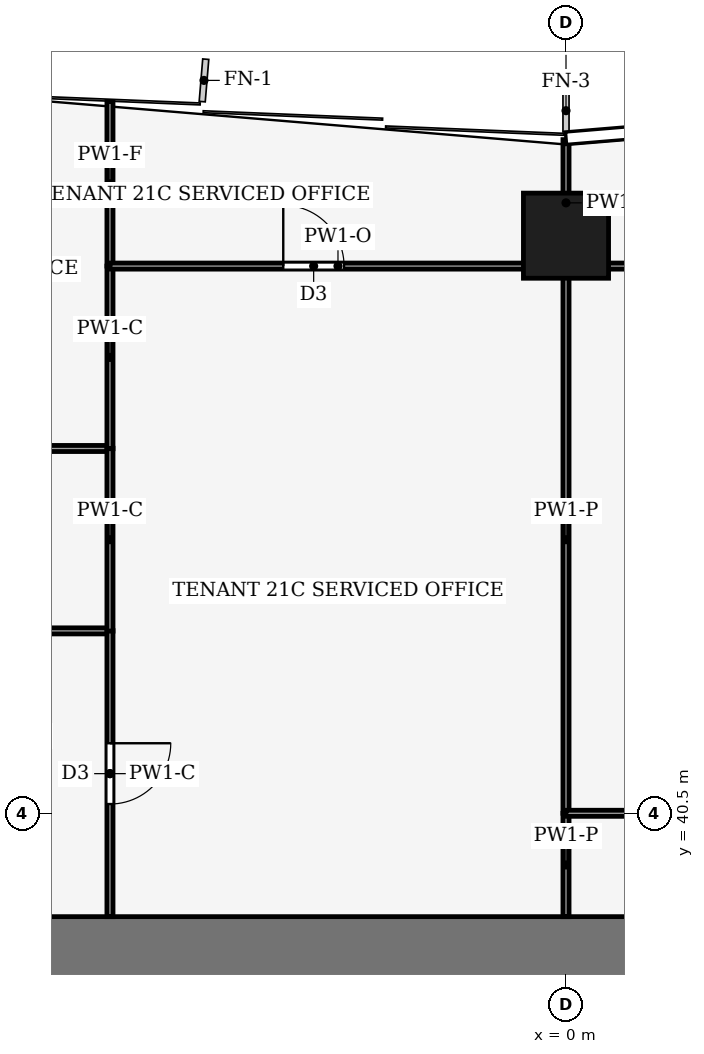
"""IFC4 building model, lengths in metres.
Left out: names, types, materials, properties, quantities, classifications, styles, units other than length and angle.
Written with IfcOpenShell. Run it as: python <this file> out.ifc"""

import sys

from ifc_helpers import new_model, si_unit, direction, frame, frame_2d, origin, origin_2d, place, context, subcontext, project, spatial, rectangle, hollow_rectangle, extrude, element, fill, save


model = new_model("IFC4")
c1 = context("Model", 3, precision=1e-05, world=origin(), true_north=direction((0.0, 1.0)))
c2 = subcontext(c1, "Body", "Model", "MODEL_VIEW")
j1 = project(units=[si_unit("LENGTHUNIT", "METRE"), si_unit("PLANEANGLEUNIT", "RADIAN")], contexts=[c1])
p1 = place(None, origin())
s1 = spatial("IfcSite", under=j1, at=p1, CompositionType="ELEMENT")
p2 = place(p1, origin())
s2 = spatial("IfcBuilding", under=s1, at=p2, CompositionType="ELEMENT")
p3 = place(p2, frame((0.0, 0.0, 94.0)))
s3 = spatial("IfcBuildingStorey", under=s2, at=p3, CompositionType="ELEMENT", Elevation=94.0)
p4 = place(p3, frame((-13.8, 38.2, -0.13), z_axis=(0.0, 0.0, 1.0), x_axis=(1.0, 0.0, 0.0)))
e1 = element("IfcWall", 1, at=p4, inside=s3, PredefinedType="SHEAR", context=c2, shape_type="SweptSolid", body=[
    extrude(rectangle(XDim=27.6, YDim=1.2, at=frame_2d((13.8, 0.0))), origin(), (0.0, 0.0, 1.0), 4.0),
])
p5 = place(p3, frame((0.0, 50.0, 0.0), z_axis=(0.0, 0.0, 1.0), x_axis=(1.0, 0.0, 0.0)))
e2 = element("IfcColumn", 2, at=p5, inside=s3, PredefinedType="COLUMN", context=c2, shape_type="SweptSolid", body=[
    extrude(hollow_rectangle(XDim=1.4, YDim=1.4, WallThickness=0.08, at=origin_2d()), origin(), (0.0, 0.0, 1.0), 4.0),
])
p6 = place(p3, frame((-13.8, 43.5, 0.0), z_axis=(0.0, 0.0, 1.0), x_axis=(1.0, 0.0, 0.0)))
e3 = element("IfcWall", 3, at=p6, inside=s3, PredefinedType="PARTITIONING", context=c2, shape_type="SweptSolid", body=[
    extrude(rectangle(XDim=6.3, YDim=0.1, at=frame_2d((3.15, 0.0))), origin(), (0.0, 0.0, 1.0), 3.39),
])
p7 = place(p6, frame((2.65, 0.0, 0.0)))
e4 = element("IfcOpeningElement", 4, at=p7, cuts=e3, PredefinedType="OPENING", context=c2, shape_type="SweptSolid", body=[
    extrude(rectangle(XDim=1.0, YDim=2.1, at=frame_2d((0.5, 1.05))), frame((0.0, 0.06, 0.0), z_axis=(0.0, -1.0, 0.0), x_axis=(1.0, 0.0, 0.0)), (0.0, 0.0, 1.0), 0.12),
])
p8 = place(p3, frame((-7.5, 43.504, 0.0), z_axis=(0.0, 0.0, 1.0), x_axis=(0.0, -1.0, 0.0)))
e5 = element("IfcWall", 5, at=p8, inside=s3, PredefinedType="PARTITIONING", context=c2, shape_type="SweptSolid", body=[
    extrude(rectangle(XDim=4.704, YDim=0.1, at=frame_2d((2.352, 0.0))), origin(), (0.0, 0.0, 1.0), 3.87),
])
p9 = place(p8, frame((1.852, 0.0, 0.0)))
e6 = element("IfcOpeningElement", 6, at=p9, cuts=e5, PredefinedType="OPENING", context=c2, shape_type="SweptSolid", body=[
    extrude(rectangle(XDim=1.0, YDim=2.1, at=frame_2d((0.5, 1.05))), frame((0.0, 0.06, 0.0), z_axis=(0.0, -1.0, 0.0), x_axis=(1.0, 0.0, 0.0)), (0.0, 0.0, 1.0), 0.12),
])
p10 = place(p3, frame((-7.5, 46.5, 0.0), z_axis=(0.0, 0.0, 1.0), x_axis=(-1.0, 0.0, 0.0)))
e7 = element("IfcWall", 7, at=p10, inside=s3, PredefinedType="PARTITIONING", context=c2, shape_type="SweptSolid", body=[
    extrude(rectangle(XDim=6.3, YDim=0.1, at=frame_2d((3.15, 0.0))), origin(), (0.0, 0.0, 1.0), 3.39),
])
p11 = place(p3, frame((-7.5, 43.496, 0.0), z_axis=(0.0, 0.0, 1.0), x_axis=(0.0, 1.0, 0.0)))
e8 = element("IfcWall", 8, at=p11, inside=s3, PredefinedType="PARTITIONING", context=c2, shape_type="SweptSolid", body=[
    extrude(rectangle(XDim=3.008, YDim=0.1, at=frame_2d((1.504, 0.0))), origin(), (0.0, 0.0, 1.0), 3.87),
])
p12 = place(p3, frame((-7.5, 46.496, 0.0), z_axis=(0.0, 0.0, 1.0), x_axis=(0.0, 1.0, 0.0)))
e9 = element("IfcWall", 9, at=p12, inside=s3, PredefinedType="PARTITIONING", context=c2, shape_type="SweptSolid", body=[
    extrude(rectangle(XDim=3.004, YDim=0.1, at=frame_2d((1.502, 0.0))), origin(), (0.0, 0.0, 1.0), 3.87),
])
p13 = place(p3, frame((-7.5, 49.5, 0.0), z_axis=(0.0, 0.0, 1.0), x_axis=(0.0, 1.0, 0.0)))
e10 = element("IfcWall", 10, at=p13, inside=s3, PredefinedType="PARTITIONING", context=c2, shape_type="SweptSolid", body=[
    extrude(rectangle(XDim=2.705, YDim=0.1, at=frame_2d((1.353, 0.0))), origin(), (0.0, 0.0, 1.0), 3.04),
])
p14 = place(p3, frame((-7.5, 49.5, 0.0), z_axis=(0.0, 0.0, 1.0), x_axis=(1.0, 0.0, 0.0)))
e11 = element("IfcWall", 11, at=p14, inside=s3, PredefinedType="PARTITIONING", context=c2, shape_type="SweptSolid", body=[
    extrude(rectangle(XDim=7.5, YDim=0.1, at=frame_2d((3.75, 0.0))), origin(), (0.0, 0.0, 1.0), 3.39),
])
p15 = place(p14, frame((2.85, 0.0, 0.0)))
e12 = element("IfcOpeningElement", 12, at=p15, cuts=e11, PredefinedType="OPENING", context=c2, shape_type="SweptSolid", body=[
    extrude(rectangle(XDim=1.0, YDim=2.1, at=frame_2d((0.5, 1.05))), frame((0.0, 0.06, 0.0), z_axis=(0.0, -1.0, 0.0), x_axis=(1.0, 0.0, 0.0)), (0.0, 0.0, 1.0), 0.12),
])
p16 = place(p3, frame((0.0, 38.8, 0.0), z_axis=(0.0, 0.0, 1.0), x_axis=(0.0, 1.0, 0.0)))
e13 = element("IfcWall", 13, at=p16, inside=s3, PredefinedType="PARTITIONING", context=c2, shape_type="SweptSolid", body=[
    extrude(rectangle(XDim=1.7, YDim=0.1, at=frame_2d((0.85, 0.0))), origin(), (0.0, 0.0, 1.0), 3.44),
])
p17 = place(p3, frame((0.0, 40.5, 0.0), z_axis=(0.0, 0.0, 1.0), x_axis=(0.0, 1.0, 0.0)))
e14 = element("IfcWall", 14, at=p17, inside=s3, PredefinedType="PARTITIONING", context=c2, shape_type="SweptSolid", body=[
    extrude(rectangle(XDim=9.0, YDim=0.1, at=frame_2d((4.5, 0.0))), origin(), (0.0, 0.0, 1.0), 3.44),
])
p18 = place(p3, frame((0.0, 49.5, 0.0), z_axis=(0.0, 0.0, 1.0), x_axis=(0.0, 1.0, 0.0)))
e15 = element("IfcWall", 15, at=p18, inside=s3, PredefinedType="PARTITIONING", context=c2, shape_type="SweptSolid", body=[
    extrude(rectangle(XDim=2.08, YDim=0.1, at=frame_2d((1.04, 0.0))), origin(), (0.0, 0.0, 1.0), 3.04),
])
p19 = place(p3, frame((10.5, 40.5, 0.0), z_axis=(0.0, 0.0, 1.0), x_axis=(-1.0, 0.0, 0.0)))
e16 = element("IfcWall", 16, at=p19, inside=s3, PredefinedType="PARTITIONING", context=c2, shape_type="SweptSolid", body=[
    extrude(rectangle(XDim=10.5, YDim=0.1, at=frame_2d((5.25, 0.0))), origin(), (0.0, 0.0, 1.0), 3.39),
])
p20 = place(p19, frame((4.75, 0.0, 0.0)))
e17 = element("IfcOpeningElement", 17, at=p20, cuts=e16, PredefinedType="OPENING", context=c2, shape_type="SweptSolid", body=[
    extrude(rectangle(XDim=1.0, YDim=2.1, at=frame_2d((0.5, 1.05))), frame((0.0, 0.06, 0.0), z_axis=(0.0, -1.0, 0.0), x_axis=(1.0, 0.0, 0.0)), (0.0, 0.0, 1.0), 0.12),
])
p21 = place(p3, frame((10.5, 49.5, 0.0), z_axis=(0.0, 0.0, 1.0), x_axis=(-1.0, 0.0, 0.0)))
e18 = element("IfcWall", 18, at=p21, inside=s3, PredefinedType="PARTITIONING", context=c2, shape_type="SweptSolid", body=[
    extrude(rectangle(XDim=10.5, YDim=0.1, at=frame_2d((5.25, 0.0))), origin(), (0.0, 0.0, 1.0), 3.39),
])
p22 = place(p9, origin())
e19 = element("IfcDoor", 19, at=p22, inside=s3, OperationType="SINGLE_SWING_RIGHT", PredefinedType="DOOR", context=c2, shape_type="SweptSolid", body=[
    extrude(rectangle(XDim=1.0, YDim=2.1, at=frame_2d((0.5, 1.05))), frame((0.0, 0.025, 0.0), z_axis=(0.0, -1.0, 0.0), x_axis=(1.0, 0.0, 0.0)), (0.0, 0.0, 1.0), 0.05),
])
fill(e6, e19)
p23 = place(p15, origin())
e20 = element("IfcDoor", 20, at=p23, inside=s3, OperationType="SINGLE_SWING_LEFT", PredefinedType="DOOR", context=c2, shape_type="SweptSolid", body=[
    extrude(rectangle(XDim=1.0, YDim=2.1, at=frame_2d((0.5, 1.05))), frame((0.0, 0.025, 0.0), z_axis=(0.0, -1.0, 0.0), x_axis=(1.0, 0.0, 0.0)), (0.0, 0.0, 1.0), 0.05),
])
fill(e12, e20)
save(model, sys.argv[1])
